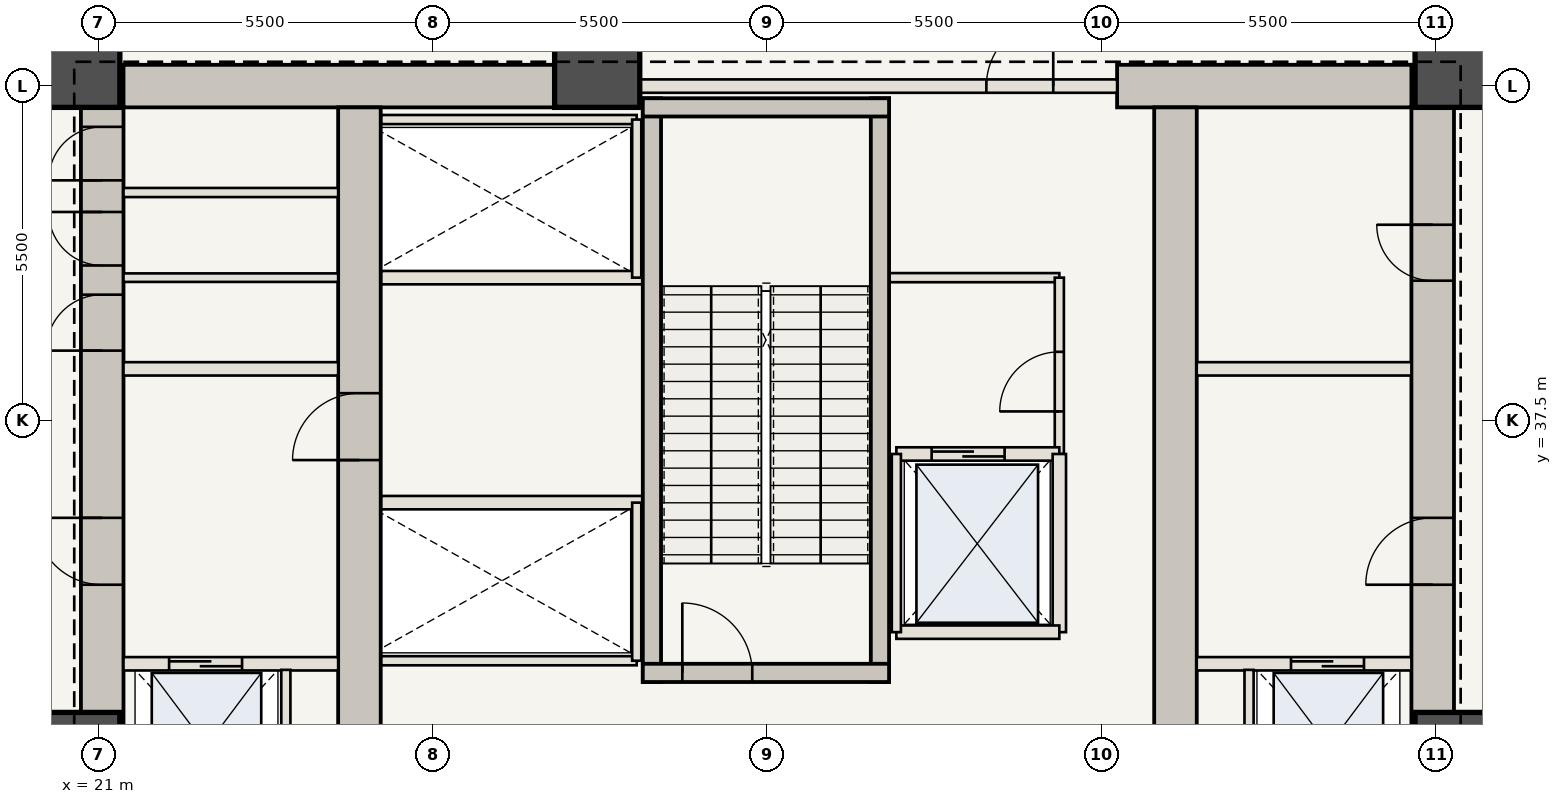
"""IFC4 building model, lengths in metres.
Left out: names, types, materials, properties, quantities, classifications, styles, units other than length and angle.
Written with IfcOpenShell. Run it as: python <this file> out.ifc"""

import sys

from ifc_helpers import new_model, si_unit, direction, frame, frame_2d, origin, origin_2d, place, context, subcontext, project, spatial, rectangle, extrude, element, fill, save


model = new_model("IFC4")
c1 = context("Model", 3, precision=1e-05, world=origin(), true_north=direction((0.0, 1.0)))
c2 = subcontext(c1, "Body", "Model", "MODEL_VIEW")
j1 = project(units=[si_unit("LENGTHUNIT", "METRE"), si_unit("PLANEANGLEUNIT", "RADIAN")], contexts=[c1])
p1 = place(None, origin())
s1 = spatial("IfcSite", under=j1, at=p1, CompositionType="ELEMENT")
p2 = place(p1, origin())
s2 = spatial("IfcBuilding", under=s1, at=p2, CompositionType="ELEMENT")
p3 = place(p2, frame((0.0, 0.0, 17.85)))
s3 = spatial("IfcBuildingStorey", under=s2, at=p3, CompositionType="ELEMENT", Elevation=17.85)
p4 = place(p3, frame((21.06, 30.6, 0.0), z_axis=(0.0, 0.0, 1.0), x_axis=(0.0, 1.0, 0.0)))
e1 = element("IfcWall", 1, at=p4, inside=s3, PredefinedType="SHEAR", context=c2, shape_type="SweptSolid", body=[
    extrude(rectangle(XDim=12.75, YDim=0.7, at=frame_2d((6.375, 0.0))), origin(), (0.0, 0.0, 1.0), 5.95),
])
p5 = place(p4, frame((4.2, 0.0, 0.0)))
e2 = element("IfcOpeningElement", 2, at=p5, cuts=e1, PredefinedType="OPENING", context=c2, shape_type="SweptSolid", body=[
    extrude(rectangle(XDim=1.1, YDim=2.15, at=frame_2d((0.55, 1.075))), frame((0.0, 0.36, 0.0), z_axis=(0.0, -1.0, 0.0), x_axis=(1.0, 0.0, 0.0)), (0.0, 0.0, 1.0), 0.72),
])
p6 = place(p4, frame((8.05, 0.0, 0.0)))
e3 = element("IfcOpeningElement", 3, at=p6, cuts=e1, PredefinedType="OPENING", context=c2, shape_type="SweptSolid", body=[
    extrude(rectangle(XDim=0.92, YDim=2.1, at=frame_2d((0.46, 1.05))), frame((0.0, 0.36, 0.0), z_axis=(0.0, -1.0, 0.0), x_axis=(1.0, 0.0, 0.0)), (0.0, 0.0, 1.0), 0.72),
])
p7 = place(p4, frame((9.45, 0.0, 0.0)))
e4 = element("IfcOpeningElement", 4, at=p7, cuts=e1, PredefinedType="OPENING", context=c2, shape_type="SweptSolid", body=[
    extrude(rectangle(XDim=0.88, YDim=2.1, at=frame_2d((0.44, 1.05))), frame((0.0, 0.36, 0.0), z_axis=(0.0, -1.0, 0.0), x_axis=(1.0, 0.0, 0.0)), (0.0, 0.0, 1.0), 0.72),
])
p8 = place(p4, frame((10.85, 0.0, 0.0)))
e5 = element("IfcOpeningElement", 5, at=p8, cuts=e1, PredefinedType="OPENING", context=c2, shape_type="SweptSolid", body=[
    extrude(rectangle(XDim=0.88, YDim=2.1, at=frame_2d((0.44, 1.05))), frame((0.0, 0.36, 0.0), z_axis=(0.0, -1.0, 0.0), x_axis=(1.0, 0.0, 0.0)), (0.0, 0.0, 1.0), 0.72),
])
p9 = place(p3, frame((42.94, 30.6, 0.0), z_axis=(0.0, 0.0, 1.0), x_axis=(0.0, 1.0, 0.0)))
e6 = element("IfcWall", 6, at=p9, inside=s3, PredefinedType="SHEAR", context=c2, shape_type="SweptSolid", body=[
    extrude(rectangle(XDim=12.75, YDim=0.7, at=frame_2d((6.375, 0.0))), origin(), (0.0, 0.0, 1.0), 5.95),
])
p10 = place(p9, frame((4.2, 0.0, 0.0)))
e7 = element("IfcOpeningElement", 7, at=p10, cuts=e6, PredefinedType="OPENING", context=c2, shape_type="SweptSolid", body=[
    extrude(rectangle(XDim=1.1, YDim=2.15, at=frame_2d((0.55, 1.075))), frame((0.0, 0.36, 0.0), z_axis=(0.0, -1.0, 0.0), x_axis=(1.0, 0.0, 0.0)), (0.0, 0.0, 1.0), 0.72),
])
p11 = place(p9, frame((9.2, 0.0, 0.0)))
e8 = element("IfcOpeningElement", 8, at=p11, cuts=e6, PredefinedType="OPENING", context=c2, shape_type="SweptSolid", body=[
    extrude(rectangle(XDim=0.92, YDim=2.1, at=frame_2d((0.46, 1.05))), frame((0.0, 0.36, 0.0), z_axis=(0.0, -1.0, 0.0), x_axis=(1.0, 0.0, 0.0)), (0.0, 0.0, 1.0), 0.72),
])
p12 = place(p3, frame((21.41, 43.0, 0.0), z_axis=(0.0, 0.0, 1.0), x_axis=(1.0, 0.0, 0.0)))
e9 = element("IfcWall", 9, at=p12, inside=s3, PredefinedType="SHEAR", context=c2, shape_type="SweptSolid", body=[
    extrude(rectangle(XDim=8.24, YDim=0.7, at=frame_2d((4.12, 0.0))), origin(), (0.0, 0.0, 1.0), 5.95),
])
p13 = place(p3, frame((37.75, 43.0, 0.0), z_axis=(0.0, 0.0, 1.0), x_axis=(1.0, 0.0, 0.0)))
e10 = element("IfcWall", 10, at=p13, inside=s3, PredefinedType="SHEAR", context=c2, shape_type="SweptSolid", body=[
    extrude(rectangle(XDim=4.84, YDim=0.7, at=frame_2d((2.42, 0.0))), origin(), (0.0, 0.0, 1.0), 5.95),
])
p14 = place(p3, frame((25.29, 30.6, 0.0), z_axis=(0.0, 0.0, 1.0), x_axis=(0.0, 1.0, 0.0)))
e11 = element("IfcWall", 11, at=p14, inside=s3, PredefinedType="SHEAR", context=c2, shape_type="SweptSolid", body=[
    extrude(rectangle(XDim=12.05, YDim=0.7, at=frame_2d((6.025, 0.0))), origin(), (0.0, 0.0, 1.0), 5.95),
])
p15 = place(p14, frame((6.25, 0.0, 0.0)))
e12 = element("IfcOpeningElement", 12, at=p15, cuts=e11, PredefinedType="OPENING", context=c2, shape_type="SweptSolid", body=[
    extrude(rectangle(XDim=1.1, YDim=2.15, at=frame_2d((0.55, 1.075))), frame((0.0, 0.36, 0.0), z_axis=(0.0, -1.0, 0.0), x_axis=(1.0, 0.0, 0.0)), (0.0, 0.0, 1.0), 0.72),
])
p16 = place(p3, frame((38.71, 30.6, 0.0), z_axis=(0.0, 0.0, 1.0), x_axis=(0.0, 1.0, 0.0)))
e13 = element("IfcWall", 13, at=p16, inside=s3, PredefinedType="SHEAR", context=c2, shape_type="SweptSolid", body=[
    extrude(rectangle(XDim=12.05, YDim=0.7, at=frame_2d((6.025, 0.0))), origin(), (0.0, 0.0, 1.0), 5.95),
])
for number, where, z_axis, x_axis in (
    (14, (43.35, 32.0, 0.0), (0.0, 0.0, 1.0), (1.0, 0.0, 0.0)),
    (15, (43.35, 43.35, 0.0), (0.0, 0.0, 1.0), (1.0, 0.0, 0.0)),
    (16, (29.2, 43.35, 0.0), (0.0, 0.0, 1.0), (1.0, 0.0, 0.0)),
    (17, (20.65, 43.35, 0.0), (0.0, 0.0, 1.0), (1.0, 0.0, 0.0)),
    (18, (20.65, 32.0, 0.0), (0.0, 0.0, 1.0), (1.0, 0.0, 0.0)),
):
    element("IfcColumn", number, at=place(p3, frame(where, z_axis=z_axis, x_axis=x_axis)), inside=s3, PredefinedType="COLUMN", context=c2, shape_type="SweptSolid", body=[
        extrude(rectangle(XDim=1.4, YDim=1.4, at=origin_2d()), origin(), (0.0, 0.0, 1.0), 5.95),
    ])
p17 = place(p3, frame((21.41, 33.5, 0.0), z_axis=(0.0, 0.0, 1.0), x_axis=(1.0, 0.0, 0.0)))
e19 = element("IfcWall", 19, at=p17, inside=s3, PredefinedType="STANDARD", context=c2, shape_type="SweptSolid", body=[
    extrude(rectangle(XDim=3.53, YDim=0.22, at=frame_2d((1.765, 0.0))), origin(), (0.0, 0.0, 1.0), 5.71),
])
p18 = place(p17, frame((0.75, 0.0, 0.0)))
e20 = element("IfcOpeningElement", 20, at=p18, cuts=e19, PredefinedType="OPENING", context=c2, shape_type="SweptSolid", body=[
    extrude(rectangle(XDim=1.2, YDim=2.2, at=frame_2d((0.6, 1.1))), frame((0.0, 0.12, 0.0), z_axis=(0.0, -1.0, 0.0), x_axis=(1.0, 0.0, 0.0)), (0.0, 0.0, 1.0), 0.24),
])
p19 = place(p3, frame((24.08, 30.75, 0.0), z_axis=(0.0, 0.0, 1.0), x_axis=(0.0, 1.0, 0.0)))
e21 = element("IfcWall", 21, at=p19, inside=s3, PredefinedType="STANDARD", context=c2, shape_type="SweptSolid", body=[
    extrude(rectangle(XDim=2.65, YDim=0.15, at=frame_2d((1.325, 0.0))), origin(), (0.0, 0.0, 1.0), 5.71),
])
p20 = place(p3, frame((39.06, 33.5, 0.0), z_axis=(0.0, 0.0, 1.0), x_axis=(1.0, 0.0, 0.0)))
e22 = element("IfcWall", 22, at=p20, inside=s3, PredefinedType="STANDARD", context=c2, shape_type="SweptSolid", body=[
    extrude(rectangle(XDim=3.53, YDim=0.22, at=frame_2d((1.765, 0.0))), origin(), (0.0, 0.0, 1.0), 5.71),
])
p21 = place(p20, frame((1.55, 0.0, 0.0)))
e23 = element("IfcOpeningElement", 23, at=p21, cuts=e22, PredefinedType="OPENING", context=c2, shape_type="SweptSolid", body=[
    extrude(rectangle(XDim=1.2, YDim=2.2, at=frame_2d((0.6, 1.1))), frame((0.0, 0.12, 0.0), z_axis=(0.0, -1.0, 0.0), x_axis=(1.0, 0.0, 0.0)), (0.0, 0.0, 1.0), 0.24),
])
p22 = place(p3, frame((39.92, 30.75, 0.0), z_axis=(0.0, 0.0, 1.0), x_axis=(0.0, 1.0, 0.0)))
e24 = element("IfcWall", 24, at=p22, inside=s3, PredefinedType="STANDARD", context=c2, shape_type="SweptSolid", body=[
    extrude(rectangle(XDim=2.65, YDim=0.15, at=frame_2d((1.325, 0.0))), origin(), (0.0, 0.0, 1.0), 5.71),
])
for number, where, z_axis, x_axis in (
    (25, (21.41, 38.35, 0.0), (0.0, 0.0, 1.0), (1.0, 0.0, 0.0)),
    (26, (39.06, 38.35, 0.0), (0.0, 0.0, 1.0), (1.0, 0.0, 0.0)),
):
    element("IfcWall", number, at=place(p3, frame(where, z_axis=z_axis, x_axis=x_axis)), inside=s3, PredefinedType="STANDARD", context=c2, shape_type="SweptSolid", body=[
        extrude(rectangle(XDim=3.53, YDim=0.22, at=frame_2d((1.765, 0.0))), origin(), (0.0, 0.0, 1.0), 5.71),
    ])
p23 = place(p3, frame((21.41, 39.85, 0.0), z_axis=(0.0, 0.0, 1.0), x_axis=(1.0, 0.0, 0.0)))
e27 = element("IfcWall", 27, at=p23, inside=s3, PredefinedType="STANDARD", context=c2, shape_type="SweptSolid", body=[
    extrude(rectangle(XDim=3.53, YDim=0.14, at=frame_2d((1.765, 0.0))), origin(), (0.0, 0.0, 1.0), 5.71),
])
p24 = place(p3, frame((21.41, 41.25, 0.0), z_axis=(0.0, 0.0, 1.0), x_axis=(1.0, 0.0, 0.0)))
e28 = element("IfcWall", 28, at=p24, inside=s3, PredefinedType="STANDARD", context=c2, shape_type="SweptSolid", body=[
    extrude(rectangle(XDim=3.53, YDim=0.15, at=frame_2d((1.765, 0.0))), origin(), (0.0, 0.0, 1.0), 5.71),
])
p25 = place(p3, frame((34.0, 39.85, 0.0), z_axis=(0.0, 0.0, 1.0), x_axis=(1.0, 0.0, 0.0)))
e29 = element("IfcWall", 29, at=p25, inside=s3, PredefinedType="STANDARD", context=c2, shape_type="SweptSolid", body=[
    extrude(rectangle(XDim=2.8, YDim=0.15, at=frame_2d((1.4, 0.0))), origin(), (0.0, 0.0, 1.0), 5.71),
])
p26 = place(p3, frame((36.8, 36.95, 0.0), z_axis=(0.0, 0.0, 1.0), x_axis=(0.0, 1.0, 0.0)))
e30 = element("IfcWall", 30, at=p26, inside=s3, PredefinedType="STANDARD", context=c2, shape_type="SweptSolid", body=[
    extrude(rectangle(XDim=2.9, YDim=0.15, at=frame_2d((1.45, 0.0))), origin(), (0.0, 0.0, 1.0), 5.71),
])
p27 = place(p26, frame((0.7, 0.0, 0.0)))
e31 = element("IfcOpeningElement", 31, at=p27, cuts=e30, PredefinedType="OPENING", context=c2, shape_type="SweptSolid", body=[
    extrude(rectangle(XDim=0.98, YDim=2.2, at=frame_2d((0.49, 1.1))), frame((0.0, 0.085, 0.0), z_axis=(0.0, -1.0, 0.0), x_axis=(1.0, 0.0, 0.0)), (0.0, 0.0, 1.0), 0.17),
])
p28 = place(p3, frame((25.65, 36.15, 0.0), z_axis=(0.0, 0.0, 1.0), x_axis=(1.0, 0.0, 0.0)))
e32 = element("IfcWall", 32, at=p28, inside=s3, PredefinedType="STANDARD", context=c2, shape_type="SweptSolid", body=[
    extrude(rectangle(XDim=4.3, YDim=0.22, at=frame_2d((2.15, 0.0))), origin(), (0.0, 0.0, 1.0), 5.71),
])
p29 = place(p3, frame((25.65, 33.55, 0.0), z_axis=(0.0, 0.0, 1.0), x_axis=(1.0, 0.0, 0.0)))
e33 = element("IfcWall", 33, at=p29, inside=s3, PredefinedType="STANDARD", context=c2, shape_type="SweptSolid", body=[
    extrude(rectangle(XDim=4.2, YDim=0.15, at=frame_2d((2.1, 0.0))), origin(), (0.0, 0.0, 1.0), 5.71),
])
p30 = place(p3, frame((29.85, 33.55, 0.0), z_axis=(0.0, 0.0, 1.0), x_axis=(0.0, 1.0, 0.0)))
e34 = element("IfcWall", 34, at=p30, inside=s3, PredefinedType="STANDARD", context=c2, shape_type="SweptSolid", body=[
    extrude(rectangle(XDim=2.6, YDim=0.15, at=frame_2d((1.3, 0.0))), origin(), (0.0, 0.0, 1.0), 5.71),
])
p31 = place(p3, frame((25.65, 39.85, 0.0), z_axis=(0.0, 0.0, 1.0), x_axis=(1.0, 0.0, 0.0)))
e35 = element("IfcWall", 35, at=p31, inside=s3, PredefinedType="STANDARD", context=c2, shape_type="SweptSolid", body=[
    extrude(rectangle(XDim=4.3, YDim=0.22, at=frame_2d((2.15, 0.0))), origin(), (0.0, 0.0, 1.0), 5.71),
])
p32 = place(p3, frame((25.65, 42.45, 0.0), z_axis=(0.0, 0.0, 1.0), x_axis=(1.0, 0.0, 0.0)))
e36 = element("IfcWall", 36, at=p32, inside=s3, PredefinedType="STANDARD", context=c2, shape_type="SweptSolid", body=[
    extrude(rectangle(XDim=4.2, YDim=0.15, at=frame_2d((2.1, 0.0))), origin(), (0.0, 0.0, 1.0), 5.71),
])
p33 = place(p3, frame((29.85, 39.85, 0.0), z_axis=(0.0, 0.0, 1.0), x_axis=(0.0, 1.0, 0.0)))
e37 = element("IfcWall", 37, at=p33, inside=s3, PredefinedType="STANDARD", context=c2, shape_type="SweptSolid", body=[
    extrude(rectangle(XDim=2.6, YDim=0.15, at=frame_2d((1.3, 0.0))), origin(), (0.0, 0.0, 1.0), 5.71),
])
for number, where, z_axis, x_axis in (
    (38, (30.1, 33.2, 0.0), (0.0, 0.0, 1.0), (0.0, 1.0, 0.0)),
    (39, (33.85, 33.2, 0.0), (0.0, 0.0, 1.0), (0.0, 1.0, 0.0)),
):
    element("IfcWall", number, at=place(p3, frame(where, z_axis=z_axis, x_axis=x_axis)), inside=s3, PredefinedType="SHEAR", context=c2, shape_type="SweptSolid", body=[
        extrude(rectangle(XDim=9.6, YDim=0.3, at=frame_2d((4.8, 0.0))), origin(), (0.0, 0.0, 1.0), 5.71),
    ])
p34 = place(p3, frame((29.95, 33.35, 0.0), z_axis=(0.0, 0.0, 1.0), x_axis=(1.0, 0.0, 0.0)))
e40 = element("IfcWall", 40, at=p34, inside=s3, PredefinedType="SHEAR", context=c2, shape_type="SweptSolid", body=[
    extrude(rectangle(XDim=4.05, YDim=0.3, at=frame_2d((2.025, 0.0))), origin(), (0.0, 0.0, 1.0), 5.71),
])
p35 = place(p34, frame((0.65, 0.0, 0.0)))
e41 = element("IfcOpeningElement", 41, at=p35, cuts=e40, PredefinedType="OPENING", context=c2, shape_type="SweptSolid", body=[
    extrude(rectangle(XDim=1.15, YDim=2.15, at=frame_2d((0.575, 1.075))), frame((0.0, 0.16, 0.0), z_axis=(0.0, -1.0, 0.0), x_axis=(1.0, 0.0, 0.0)), (0.0, 0.0, 1.0), 0.32),
])
p36 = place(p3, frame((29.95, 42.65, 0.0), z_axis=(0.0, 0.0, 1.0), x_axis=(1.0, 0.0, 0.0)))
e42 = element("IfcWall", 42, at=p36, inside=s3, PredefinedType="SHEAR", context=c2, shape_type="SweptSolid", body=[
    extrude(rectangle(XDim=4.05, YDim=0.3, at=frame_2d((2.025, 0.0))), origin(), (0.0, 0.0, 1.0), 5.71),
])
p37 = place(p3, frame((29.65, 43.0, 0.0), z_axis=(0.0, 0.0, 1.0), x_axis=(1.0, 0.0, 0.0)))
e43 = element("IfcWall", 43, at=p37, inside=s3, PredefinedType="STANDARD", context=c2, shape_type="SweptSolid", body=[
    extrude(rectangle(XDim=8.1, YDim=0.22, at=frame_2d((4.05, 0.0))), origin(), (0.0, 0.0, 1.0), 5.71),
])
p38 = place(p37, frame((5.95, 0.0, 0.0)))
e44 = element("IfcOpeningElement", 44, at=p38, cuts=e43, PredefinedType="OPENING", context=c2, shape_type="SweptSolid", body=[
    extrude(rectangle(XDim=1.1, YDim=2.15, at=frame_2d((0.55, 1.075))), frame((0.0, 0.12, 0.0), z_axis=(0.0, -1.0, 0.0), x_axis=(1.0, 0.0, 0.0)), (0.0, 0.0, 1.0), 0.24),
])
p39 = place(p3, frame((34.12, 36.95, 0.0), z_axis=(0.0, 0.0, 1.0), x_axis=(1.0, 0.0, 0.0)))
e45 = element("IfcWall", 45, at=p39, inside=s3, PredefinedType="STANDARD", context=c2, shape_type="SweptSolid", body=[
    extrude(rectangle(XDim=2.68, YDim=0.22, at=frame_2d((1.34, 0.0))), origin(), (0.0, 0.0, 1.0), 5.71),
])
p40 = place(p39, frame((0.58, 0.0, 0.0)))
e46 = element("IfcOpeningElement", 46, at=p40, cuts=e45, PredefinedType="OPENING", context=c2, shape_type="SweptSolid", body=[
    extrude(rectangle(XDim=1.2, YDim=2.2, at=frame_2d((0.6, 1.1))), frame((0.0, 0.12, 0.0), z_axis=(0.0, -1.0, 0.0), x_axis=(1.0, 0.0, 0.0)), (0.0, 0.0, 1.0), 0.24),
])
p41 = place(p3, frame((36.8, 34.02, 0.0), z_axis=(0.0, 0.0, 1.0), x_axis=(0.0, 1.0, 0.0)))
e47 = element("IfcWall", 47, at=p41, inside=s3, PredefinedType="STANDARD", context=c2, shape_type="SweptSolid", body=[
    extrude(rectangle(XDim=2.93, YDim=0.22, at=frame_2d((1.465, 0.0))), origin(), (0.0, 0.0, 1.0), 5.71),
])
p42 = place(p3, frame((34.12, 34.02, 0.0), z_axis=(0.0, 0.0, 1.0), x_axis=(1.0, 0.0, 0.0)))
e48 = element("IfcWall", 48, at=p42, inside=s3, PredefinedType="STANDARD", context=c2, shape_type="SweptSolid", body=[
    extrude(rectangle(XDim=2.68, YDim=0.22, at=frame_2d((1.34, 0.0))), origin(), (0.0, 0.0, 1.0), 5.71),
])
p43 = place(p3, frame((34.12, 34.02, 0.0), z_axis=(0.0, 0.0, 1.0), x_axis=(0.0, 1.0, 0.0)))
e49 = element("IfcWall", 49, at=p43, inside=s3, PredefinedType="STANDARD", context=c2, shape_type="SweptSolid", body=[
    extrude(rectangle(XDim=2.93, YDim=0.15, at=frame_2d((1.465, 0.0))), origin(), (0.0, 0.0, 1.0), 5.71),
])
p44 = place(p5, origin())
e50 = element("IfcDoor", 50, at=p44, inside=s3, OperationType="SINGLE_SWING_RIGHT", PredefinedType="DOOR", context=c2, shape_type="SweptSolid", body=[
    extrude(rectangle(XDim=1.1, YDim=2.15, at=frame_2d((0.55, 1.075))), frame((0.0, 0.025, 0.0), z_axis=(0.0, -1.0, 0.0), x_axis=(1.0, 0.0, 0.0)), (0.0, 0.0, 1.0), 0.05),
])
fill(e2, e50)
p45 = place(p10, origin())
e51 = element("IfcDoor", 51, at=p45, inside=s3, OperationType="SINGLE_SWING_LEFT", PredefinedType="DOOR", context=c2, shape_type="SweptSolid", body=[
    extrude(rectangle(XDim=1.1, YDim=2.15, at=frame_2d((0.55, 1.075))), frame((0.0, 0.025, 0.0), z_axis=(0.0, -1.0, 0.0), x_axis=(1.0, 0.0, 0.0)), (0.0, 0.0, 1.0), 0.05),
])
fill(e7, e51)
p46 = place(p15, origin())
e52 = element("IfcDoor", 52, at=p46, inside=s3, OperationType="SINGLE_SWING_LEFT", PredefinedType="DOOR", context=c2, shape_type="SweptSolid", body=[
    extrude(rectangle(XDim=1.1, YDim=2.15, at=frame_2d((0.55, 1.075))), frame((0.0, 0.025, 0.0), z_axis=(0.0, -1.0, 0.0), x_axis=(1.0, 0.0, 0.0)), (0.0, 0.0, 1.0), 0.05),
])
fill(e12, e52)
p47 = place(p6, origin())
e53 = element("IfcDoor", 53, at=p47, inside=s3, OperationType="SINGLE_SWING_LEFT", PredefinedType="DOOR", context=c2, shape_type="SweptSolid", body=[
    extrude(rectangle(XDim=0.92, YDim=2.1, at=frame_2d((0.46, 1.05))), frame((0.0, 0.025, 0.0), z_axis=(0.0, -1.0, 0.0), x_axis=(1.0, 0.0, 0.0)), (0.0, 0.0, 1.0), 0.05),
])
fill(e3, e53)
p48 = place(p7, origin())
e54 = element("IfcDoor", 54, at=p48, inside=s3, OperationType="SINGLE_SWING_RIGHT", PredefinedType="DOOR", context=c2, shape_type="SweptSolid", body=[
    extrude(rectangle(XDim=0.88, YDim=2.1, at=frame_2d((0.44, 1.05))), frame((0.0, 0.025, 0.0), z_axis=(0.0, -1.0, 0.0), x_axis=(1.0, 0.0, 0.0)), (0.0, 0.0, 1.0), 0.05),
])
fill(e4, e54)
p49 = place(p8, origin())
e55 = element("IfcDoor", 55, at=p49, inside=s3, OperationType="SINGLE_SWING_LEFT", PredefinedType="DOOR", context=c2, shape_type="SweptSolid", body=[
    extrude(rectangle(XDim=0.88, YDim=2.1, at=frame_2d((0.44, 1.05))), frame((0.0, 0.025, 0.0), z_axis=(0.0, -1.0, 0.0), x_axis=(1.0, 0.0, 0.0)), (0.0, 0.0, 1.0), 0.05),
])
fill(e5, e55)
p50 = place(p11, origin())
e56 = element("IfcDoor", 56, at=p50, inside=s3, OperationType="SINGLE_SWING_RIGHT", PredefinedType="DOOR", context=c2, shape_type="SweptSolid", body=[
    extrude(rectangle(XDim=0.92, YDim=2.1, at=frame_2d((0.46, 1.05))), frame((0.0, 0.025, 0.0), z_axis=(0.0, -1.0, 0.0), x_axis=(1.0, 0.0, 0.0)), (0.0, 0.0, 1.0), 0.05),
])
fill(e8, e56)
p51 = place(p18, origin())
e57 = element("IfcDoor", 57, at=p51, inside=s3, OperationType="DOUBLE_DOOR_SLIDING", PredefinedType="DOOR", context=c2, shape_type="SweptSolid", body=[
    extrude(rectangle(XDim=1.2, YDim=2.2, at=frame_2d((0.6, 1.1))), frame((0.0, 0.025, 0.0), z_axis=(0.0, -1.0, 0.0), x_axis=(1.0, 0.0, 0.0)), (0.0, 0.0, 1.0), 0.05),
])
fill(e20, e57)
p52 = place(p21, origin())
e58 = element("IfcDoor", 58, at=p52, inside=s3, OperationType="DOUBLE_DOOR_SLIDING", PredefinedType="DOOR", context=c2, shape_type="SweptSolid", body=[
    extrude(rectangle(XDim=1.2, YDim=2.2, at=frame_2d((0.6, 1.1))), frame((0.0, 0.025, 0.0), z_axis=(0.0, -1.0, 0.0), x_axis=(1.0, 0.0, 0.0)), (0.0, 0.0, 1.0), 0.05),
])
fill(e23, e58)
p53 = place(p27, origin())
e59 = element("IfcDoor", 59, at=p53, inside=s3, OperationType="SINGLE_SWING_LEFT", PredefinedType="DOOR", context=c2, shape_type="SweptSolid", body=[
    extrude(rectangle(XDim=0.98, YDim=2.2, at=frame_2d((0.49, 1.1))), frame((0.0, 0.025, 0.0), z_axis=(0.0, -1.0, 0.0), x_axis=(1.0, 0.0, 0.0)), (0.0, 0.0, 1.0), 0.05),
])
fill(e31, e59)
p54 = place(p35, origin())
e60 = element("IfcDoor", 60, at=p54, inside=s3, OperationType="SINGLE_SWING_LEFT", PredefinedType="DOOR", context=c2, shape_type="SweptSolid", body=[
    extrude(rectangle(XDim=1.15, YDim=2.15, at=frame_2d((0.575, 1.075))), frame((0.0, 0.025, 0.0), z_axis=(0.0, -1.0, 0.0), x_axis=(1.0, 0.0, 0.0)), (0.0, 0.0, 1.0), 0.05),
])
fill(e41, e60)
p55 = place(p38, origin())
e61 = element("IfcDoor", 61, at=p55, inside=s3, OperationType="SINGLE_SWING_RIGHT", PredefinedType="DOOR", context=c2, shape_type="SweptSolid", body=[
    extrude(rectangle(XDim=1.1, YDim=2.15, at=frame_2d((0.55, 1.075))), frame((0.0, 0.025, 0.0), z_axis=(0.0, -1.0, 0.0), x_axis=(1.0, 0.0, 0.0)), (0.0, 0.0, 1.0), 0.05),
])
fill(e44, e61)
p56 = place(p40, origin())
e62 = element("IfcDoor", 62, at=p56, inside=s3, OperationType="DOUBLE_DOOR_SLIDING", PredefinedType="DOOR", context=c2, shape_type="SweptSolid", body=[
    extrude(rectangle(XDim=1.2, YDim=2.2, at=frame_2d((0.6, 1.1))), frame((0.0, 0.025, 0.0), z_axis=(0.0, -1.0, 0.0), x_axis=(1.0, 0.0, 0.0)), (0.0, 0.0, 1.0), 0.05),
])
fill(e46, e62)
save(model, sys.argv[1])
